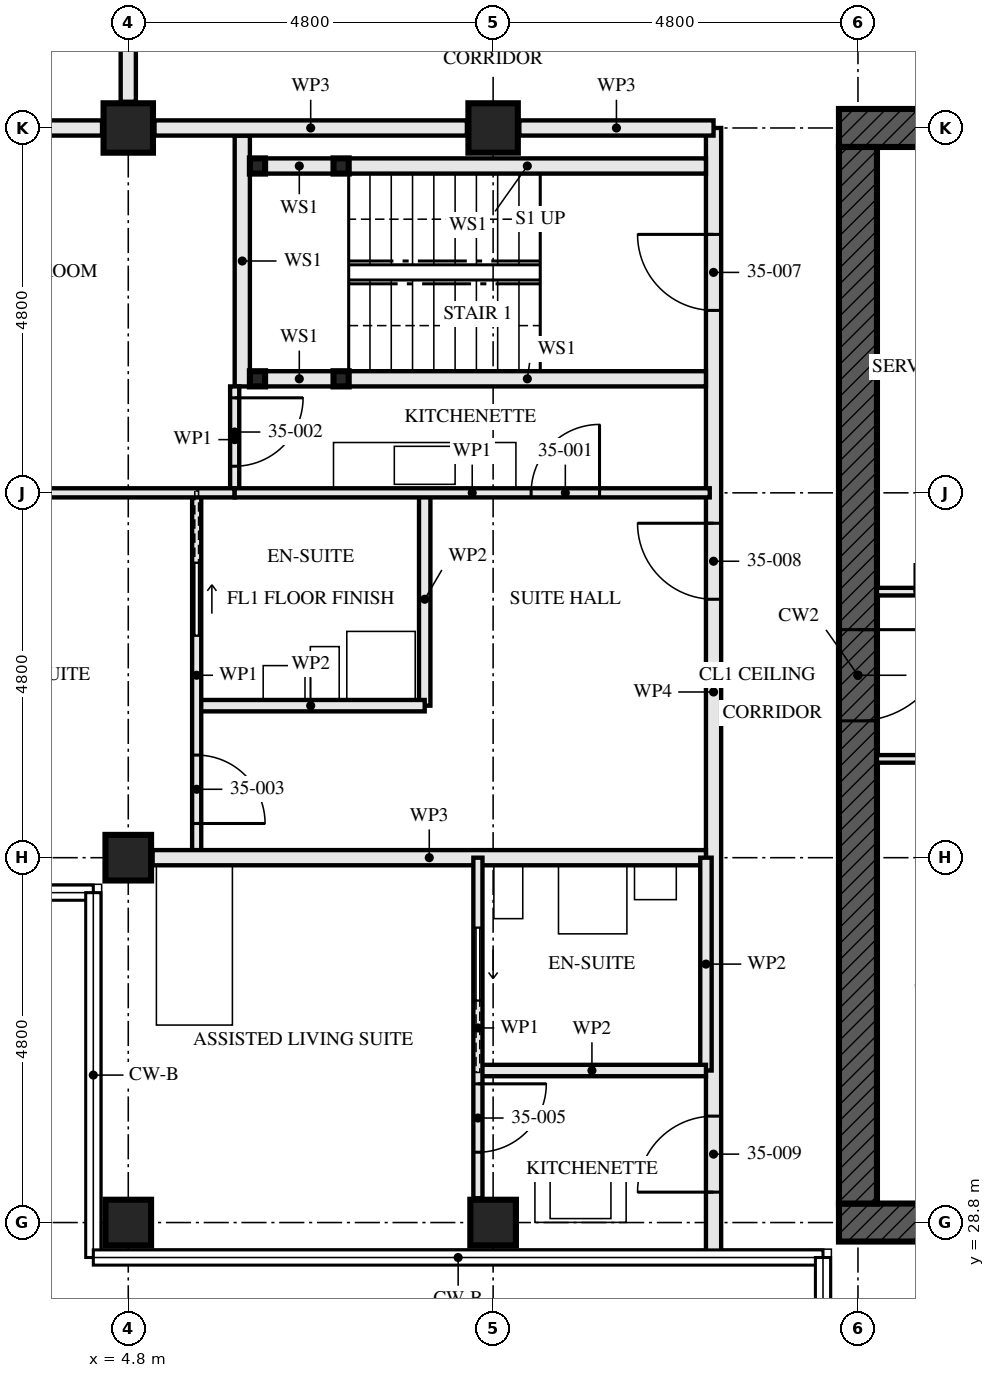
"""IFC4 building model, lengths in metres.
Left out: names, types, materials, properties, quantities, classifications, styles, units other than length and angle.
Written with IfcOpenShell. Run it as: python <this file> out.ifc"""

import sys

from ifc_helpers import new_model, si_unit, direction, frame, frame_2d, origin, origin_2d, place, context, subcontext, project, spatial, rectangle, hollow_rectangle, extrude, element, fill, save


model = new_model("IFC4")
c1 = context("Model", 3, precision=1e-05, world=origin(), true_north=direction((0.0, 1.0)))
c2 = subcontext(c1, "Body", "Model", "MODEL_VIEW")
j1 = project(units=[si_unit("LENGTHUNIT", "METRE"), si_unit("PLANEANGLEUNIT", "RADIAN")], contexts=[c1])
p1 = place(None, origin())
s1 = spatial("IfcSite", under=j1, at=p1, CompositionType="ELEMENT")
p2 = place(p1, origin())
s2 = spatial("IfcBuilding", under=s1, at=p2, CompositionType="ELEMENT")
p3 = place(p2, frame((0.0, 0.0, 129.5)))
s3 = spatial("IfcBuildingStorey", under=s2, at=p3, CompositionType="ELEMENT", Elevation=129.5)
for number, where, z_axis, x_axis in (
    (1, (4.8, 28.8, 0.0), (0.0, 0.0, 1.0), (0.0, 1.0, 0.0)),
    (2, (4.8, 33.6, 0.0), (0.0, 0.0, 1.0), (0.0, 1.0, 0.0)),
):
    element("IfcColumn", number, at=place(p3, frame(where, z_axis=z_axis, x_axis=x_axis)), inside=s3, PredefinedType="COLUMN", context=c2, shape_type="SweptSolid", body=[
        extrude(hollow_rectangle(XDim=0.6, YDim=0.6, WallThickness=0.08, at=origin_2d()), origin(), (0.0, 0.0, 1.0), 3.5),
    ])
p4 = place(p3, frame((4.8, 43.2, 0.0), z_axis=(0.0, 0.0, 1.0), x_axis=(0.0, 1.0, 0.0)))
e3 = element("IfcColumn", 3, at=p4, inside=s3, PredefinedType="COLUMN", context=c2, shape_type="SweptSolid", body=[
    extrude(hollow_rectangle(XDim=0.65, YDim=0.65, WallThickness=0.05, at=origin_2d()), origin(), (0.0, 0.0, 1.0), 3.5),
])
p5 = place(p3, frame((9.6, 28.8, 0.0), z_axis=(0.0, 0.0, 1.0), x_axis=(0.0, 1.0, 0.0)))
e4 = element("IfcColumn", 4, at=p5, inside=s3, PredefinedType="COLUMN", context=c2, shape_type="SweptSolid", body=[
    extrude(hollow_rectangle(XDim=0.6, YDim=0.6, WallThickness=0.08, at=origin_2d()), origin(), (0.0, 0.0, 1.0), 3.5),
])
p6 = place(p3, frame((9.6, 43.2, 0.0), z_axis=(0.0, 0.0, 1.0), x_axis=(0.0, 1.0, 0.0)))
e5 = element("IfcColumn", 5, at=p6, inside=s3, PredefinedType="COLUMN", context=c2, shape_type="SweptSolid", body=[
    extrude(hollow_rectangle(XDim=0.65, YDim=0.65, WallThickness=0.05, at=origin_2d()), origin(), (0.0, 0.0, 1.0), 3.5),
])
p7 = place(p3, frame((14.15, 28.8, -0.17), z_axis=(0.0, 0.0, 1.0), x_axis=(1.0, 0.0, 0.0)))
e6 = element("IfcWall", 6, at=p7, inside=s3, PredefinedType="SHEAR", context=c2, shape_type="SweptSolid", body=[
    extrude(rectangle(XDim=14.9, YDim=0.5, at=frame_2d((7.45, 0.0))), origin(), (0.0, 0.0, 1.0), 3.5),
])
p8 = place(p7, frame((6.85, 0.0, 0.17)))
e7 = element("IfcOpeningElement", 7, at=p8, cuts=e6, PredefinedType="OPENING", context=c2, shape_type="SweptSolid", body=[
    extrude(rectangle(XDim=1.2, YDim=2.1, at=frame_2d((0.6, 1.05))), frame((0.0, 0.26, 0.0), z_axis=(0.0, -1.0, 0.0), x_axis=(1.0, 0.0, 0.0)), (0.0, 0.0, 1.0), 0.521),
])
p9 = place(p3, frame((29.05, 43.2, -0.17), z_axis=(0.0, 0.0, 1.0), x_axis=(-1.0, 0.0, 0.0)))
e8 = element("IfcWall", 8, at=p9, inside=s3, PredefinedType="SHEAR", context=c2, shape_type="SweptSolid", body=[
    extrude(rectangle(XDim=14.9, YDim=0.5, at=frame_2d((7.45, 0.0))), origin(), (0.0, 0.0, 1.0), 3.5),
])
p10 = place(p9, frame((6.85, 0.0, 0.17)))
e9 = element("IfcOpeningElement", 9, at=p10, cuts=e8, PredefinedType="OPENING", context=c2, shape_type="SweptSolid", body=[
    extrude(rectangle(XDim=1.2, YDim=2.1, at=frame_2d((0.6, 1.05))), frame((0.0, 0.26, 0.0), z_axis=(0.0, -1.0, 0.0), x_axis=(1.0, 0.0, 0.0)), (0.0, 0.0, 1.0), 0.521),
])
p11 = place(p3, frame((14.4, 42.95, -0.17), z_axis=(0.0, 0.0, 1.0), x_axis=(0.0, -1.0, 0.0)))
e10 = element("IfcWall", 10, at=p11, inside=s3, PredefinedType="SHEAR", context=c2, shape_type="SweptSolid", body=[
    extrude(rectangle(XDim=13.9, YDim=0.5, at=frame_2d((6.95, 0.0))), origin(), (0.0, 0.0, 1.0), 3.5),
])
p12 = place(p11, frame((6.35, 0.0, 0.17)))
e11 = element("IfcOpeningElement", 11, at=p12, cuts=e10, PredefinedType="OPENING", context=c2, shape_type="SweptSolid", body=[
    extrude(rectangle(XDim=1.2, YDim=2.1, at=frame_2d((0.6, 1.05))), frame((0.0, 0.26, 0.0), z_axis=(0.0, -1.0, 0.0), x_axis=(1.0, 0.0, 0.0)), (0.0, 0.0, 1.0), 0.521),
])
for number, where, z_axis, x_axis in (
    (12, (6.5, 42.7, 0.0), (0.0, 0.0, 1.0), (1.0, 0.0, 0.0)),
    (13, (6.5, 39.9, 0.0), (0.0, 0.0, 1.0), (1.0, 0.0, 0.0)),
    (14, (7.6, 42.7, 0.0), (0.0, 0.0, 1.0), (1.0, 0.0, 0.0)),
    (15, (7.6, 39.9, 0.0), (0.0, 0.0, 1.0), (1.0, 0.0, 0.0)),
):
    element("IfcColumn", number, at=place(p3, frame(where, z_axis=z_axis, x_axis=x_axis)), inside=s3, PredefinedType="COLUMN", context=c2, shape_type="SweptSolid", body=[
        extrude(hollow_rectangle(XDim=0.2, YDim=0.2, WallThickness=0.008, at=origin_2d()), origin(), (0.0, 0.0, 1.0), 3.33),
    ])
p13 = place(p3, frame((6.6, 42.7, 0.0), z_axis=(0.0, 0.0, 1.0), x_axis=(1.0, 0.0, 0.0)))
e16 = element("IfcWall", 16, at=p13, inside=s3, PredefinedType="SOLIDWALL", context=c2, shape_type="SweptSolid", body=[
    extrude(rectangle(XDim=0.9, YDim=0.2, at=frame_2d((0.45, 0.0))), origin(), (0.0, 0.0, 1.0), 2.99),
])
p14 = place(p3, frame((7.7, 42.7, 0.0), z_axis=(0.0, 0.0, 1.0), x_axis=(1.0, 0.0, 0.0)))
e17 = element("IfcWall", 17, at=p14, inside=s3, PredefinedType="SOLIDWALL", context=c2, shape_type="SweptSolid", body=[
    extrude(rectangle(XDim=4.7, YDim=0.2, at=frame_2d((2.35, 0.0))), origin(), (0.0, 0.0, 1.0), 2.99),
])
p15 = place(p3, frame((6.6, 39.9, 0.0), z_axis=(0.0, 0.0, 1.0), x_axis=(1.0, 0.0, 0.0)))
e18 = element("IfcWall", 18, at=p15, inside=s3, PredefinedType="SOLIDWALL", context=c2, shape_type="SweptSolid", body=[
    extrude(rectangle(XDim=0.9, YDim=0.2, at=frame_2d((0.45, 0.0))), origin(), (0.0, 0.0, 1.0), 2.99),
])
p16 = place(p3, frame((7.7, 39.9, 0.0), z_axis=(0.0, 0.0, 1.0), x_axis=(1.0, 0.0, 0.0)))
e19 = element("IfcWall", 19, at=p16, inside=s3, PredefinedType="SOLIDWALL", context=c2, shape_type="SweptSolid", body=[
    extrude(rectangle(XDim=4.7, YDim=0.2, at=frame_2d((2.35, 0.0))), origin(), (0.0, 0.0, 1.0), 2.99),
])
p17 = place(p3, frame((6.3, 43.1, 0.0), z_axis=(0.0, 0.0, 1.0), x_axis=(0.0, -1.0, 0.0)))
e20 = element("IfcWall", 20, at=p17, inside=s3, PredefinedType="SOLIDWALL", context=c2, shape_type="SweptSolid", body=[
    extrude(rectangle(XDim=3.3, YDim=0.2, at=frame_2d((1.65, 0.0))), origin(), (0.0, 0.0, 1.0), 3.33),
])
p18 = place(p3, frame((5.7, 35.6, 0.0), z_axis=(0.0, 0.0, 1.0), x_axis=(1.0, 0.0, 0.0)))
e21 = element("IfcWall", 21, at=p18, inside=s3, PredefinedType="PARTITIONING", context=c2, shape_type="SweptSolid", body=[
    extrude(rectangle(XDim=3.0, YDim=0.15, at=frame_2d((1.5, 0.0))), origin(), (0.0, 0.0, 1.0), 3.33),
])
p19 = place(p3, frame((8.7, 38.4, 0.0), z_axis=(0.0, 0.0, 1.0), x_axis=(0.0, -1.0, 0.0)))
e22 = element("IfcWall", 22, at=p19, inside=s3, PredefinedType="PARTITIONING", context=c2, shape_type="SweptSolid", body=[
    extrude(rectangle(XDim=2.8, YDim=0.15, at=frame_2d((1.4, 0.0))), origin(), (0.0, 0.0, 1.0), 3.33),
])
p20 = place(p3, frame((6.2, 38.4, 0.0), z_axis=(0.0, 0.0, 1.0), x_axis=(1.0, 0.0, 0.0)))
e23 = element("IfcWall", 23, at=p20, inside=s3, PredefinedType="PARTITIONING", context=c2, shape_type="SweptSolid", body=[
    extrude(rectangle(XDim=6.25, YDim=0.12, at=frame_2d((3.125, 0.0))), origin(), (0.0, 0.0, 1.0), 2.55),
])
p21 = place(p20, frame((3.9, 0.0, 0.0)))
e24 = element("IfcOpeningElement", 24, at=p21, cuts=e23, PredefinedType="OPENING", context=c2, shape_type="SweptSolid", body=[
    extrude(rectangle(XDim=0.9, YDim=2.1, at=frame_2d((0.45, 1.05))), frame((0.0, 0.071, 0.0), z_axis=(0.0, -1.0, 0.0), x_axis=(1.0, 0.0, 0.0)), (0.0, 0.0, 1.0), 0.141),
])
p22 = place(p3, frame((6.2, 39.8, 0.0), z_axis=(0.0, 0.0, 1.0), x_axis=(0.0, -1.0, 0.0)))
e25 = element("IfcWall", 25, at=p22, inside=s3, PredefinedType="PARTITIONING", context=c2, shape_type="SweptSolid", body=[
    extrude(rectangle(XDim=1.4, YDim=0.12, at=frame_2d((0.7, 0.0))), origin(), (0.0, 0.0, 1.0), 3.33),
])
p23 = place(p22, frame((0.15, 0.0, 0.0)))
e26 = element("IfcOpeningElement", 26, at=p23, cuts=e25, PredefinedType="OPENING", context=c2, shape_type="SweptSolid", body=[
    extrude(rectangle(XDim=0.9, YDim=2.1, at=frame_2d((0.45, 1.05))), frame((0.0, 0.071, 0.0), z_axis=(0.0, -1.0, 0.0), x_axis=(1.0, 0.0, 0.0)), (0.0, 0.0, 1.0), 0.141),
])
p24 = place(p3, frame((5.7, 38.4, 0.0), z_axis=(0.0, 0.0, 1.0), x_axis=(0.0, -1.0, 0.0)))
e27 = element("IfcWall", 27, at=p24, inside=s3, PredefinedType="PARTITIONING", context=c2, shape_type="SweptSolid", body=[
    extrude(rectangle(XDim=4.8, YDim=0.12, at=frame_2d((2.4, 0.0))), origin(), (0.0, 0.0, 1.0), 3.33),
])
p25 = place(p24, frame((3.45, 0.0, 0.0)))
e28 = element("IfcOpeningElement", 28, at=p25, cuts=e27, PredefinedType="OPENING", context=c2, shape_type="SweptSolid", body=[
    extrude(rectangle(XDim=0.9, YDim=2.1, at=frame_2d((0.45, 1.05))), frame((0.0, 0.071, 0.0), z_axis=(0.0, -1.0, 0.0), x_axis=(1.0, 0.0, 0.0)), (0.0, 0.0, 1.0), 0.141),
])
p26 = place(p24, frame((0.925, 0.0, 0.0)))
e29 = element("IfcOpeningElement", 29, at=p26, cuts=e27, PredefinedType="OPENING", context=c2, shape_type="SweptSolid", body=[
    extrude(rectangle(XDim=0.95, YDim=2.1, at=frame_2d((0.475, 1.05))), frame((0.0, 0.071, 0.0), z_axis=(0.0, -1.0, 0.0), x_axis=(1.0, 0.0, 0.0)), (0.0, 0.0, 1.0), 0.141),
])
p27 = place(p3, frame((0.32, 38.4, 0.0), z_axis=(0.0, 0.0, 1.0), x_axis=(1.0, 0.0, 0.0)))
e30 = element("IfcWall", 30, at=p27, inside=s3, PredefinedType="PARTITIONING", context=c2, shape_type="SweptSolid", body=[
    extrude(rectangle(XDim=5.88, YDim=0.12, at=frame_2d((2.94, 0.0))), origin(), (0.0, 0.0, 1.0), 2.55),
])
p28 = place(p3, frame((5.12, 33.6, 0.0), z_axis=(0.0, 0.0, 1.0), x_axis=(1.0, 0.0, 0.0)))
e31 = element("IfcWall", 31, at=p28, inside=s3, PredefinedType="PARTITIONING", context=c2, shape_type="SweptSolid", body=[
    extrude(rectangle(XDim=7.28, YDim=0.2, at=frame_2d((3.64, 0.0))), origin(), (0.0, 0.0, 1.0), 2.55),
])
p29 = place(p3, frame((9.4, 30.8, 0.0), z_axis=(0.0, 0.0, 1.0), x_axis=(1.0, 0.0, 0.0)))
e32 = element("IfcWall", 32, at=p29, inside=s3, PredefinedType="PARTITIONING", context=c2, shape_type="SweptSolid", body=[
    extrude(rectangle(XDim=3.0, YDim=0.15, at=frame_2d((1.5, 0.0))), origin(), (0.0, 0.0, 1.0), 3.33),
])
p30 = place(p3, frame((12.4, 33.6, 0.0), z_axis=(0.0, 0.0, 1.0), x_axis=(0.0, -1.0, 0.0)))
e33 = element("IfcWall", 33, at=p30, inside=s3, PredefinedType="PARTITIONING", context=c2, shape_type="SweptSolid", body=[
    extrude(rectangle(XDim=2.8, YDim=0.15, at=frame_2d((1.4, 0.0))), origin(), (0.0, 0.0, 1.0), 3.33),
])
p31 = place(p3, frame((9.4, 33.6, 0.0), z_axis=(0.0, 0.0, 1.0), x_axis=(0.0, -1.0, 0.0)))
e34 = element("IfcWall", 34, at=p31, inside=s3, PredefinedType="PARTITIONING", context=c2, shape_type="SweptSolid", body=[
    extrude(rectangle(XDim=4.48, YDim=0.12, at=frame_2d((2.24, 0.0))), origin(), (0.0, 0.0, 1.0), 3.33),
])
p32 = place(p31, frame((2.975, 0.0, 0.0)))
e35 = element("IfcOpeningElement", 35, at=p32, cuts=e34, PredefinedType="OPENING", context=c2, shape_type="SweptSolid", body=[
    extrude(rectangle(XDim=0.9, YDim=2.1, at=frame_2d((0.45, 1.05))), frame((0.0, 0.071, 0.0), z_axis=(0.0, -1.0, 0.0), x_axis=(1.0, 0.0, 0.0)), (0.0, 0.0, 1.0), 0.141),
])
p33 = place(p31, frame((0.925, 0.0, 0.0)))
e36 = element("IfcOpeningElement", 36, at=p33, cuts=e34, PredefinedType="OPENING", context=c2, shape_type="SweptSolid", body=[
    extrude(rectangle(XDim=0.95, YDim=2.1, at=frame_2d((0.475, 1.05))), frame((0.0, 0.071, 0.0), z_axis=(0.0, -1.0, 0.0), x_axis=(1.0, 0.0, 0.0)), (0.0, 0.0, 1.0), 0.141),
])
p34 = place(p3, frame((12.5, 43.2, 0.0), z_axis=(0.0, 0.0, 1.0), x_axis=(0.0, -1.0, 0.0)))
e37 = element("IfcWall", 37, at=p34, inside=s3, PredefinedType="PARTITIONING", context=c2, shape_type="SweptSolid", body=[
    extrude(rectangle(XDim=14.84, YDim=0.2, at=frame_2d((7.42, 0.0))), origin(), (0.0, 0.0, 1.0), 2.32),
])
p35 = place(p34, frame((1.4, 0.0, 0.0)))
e38 = element("IfcOpeningElement", 38, at=p35, cuts=e37, PredefinedType="OPENING", context=c2, shape_type="SweptSolid", body=[
    extrude(rectangle(XDim=1.0, YDim=2.1, at=frame_2d((0.5, 1.05))), frame((0.0, 0.111, 0.0), z_axis=(0.0, -1.0, 0.0), x_axis=(1.0, 0.0, 0.0)), (0.0, 0.0, 1.0), 0.221),
])
p36 = place(p34, frame((5.2, 0.0, 0.0)))
e39 = element("IfcOpeningElement", 39, at=p36, cuts=e37, PredefinedType="OPENING", context=c2, shape_type="SweptSolid", body=[
    extrude(rectangle(XDim=1.0, YDim=2.1, at=frame_2d((0.5, 1.05))), frame((0.0, 0.111, 0.0), z_axis=(0.0, -1.0, 0.0), x_axis=(1.0, 0.0, 0.0)), (0.0, 0.0, 1.0), 0.221),
])
p37 = place(p34, frame((13.0, 0.0, 0.0)))
e40 = element("IfcOpeningElement", 40, at=p37, cuts=e37, PredefinedType="OPENING", context=c2, shape_type="SweptSolid", body=[
    extrude(rectangle(XDim=1.0, YDim=2.1, at=frame_2d((0.5, 1.05))), frame((0.0, 0.111, 0.0), z_axis=(0.0, -1.0, 0.0), x_axis=(1.0, 0.0, 0.0)), (0.0, 0.0, 1.0), 0.221),
])
p38 = place(p3, frame((4.8, 45.2, 0.0), z_axis=(0.0, 0.0, 1.0), x_axis=(0.0, -1.0, 0.0)))
e41 = element("IfcWall", 41, at=p38, inside=s3, PredefinedType="PARTITIONING", context=c2, shape_type="SweptSolid", body=[
    extrude(rectangle(XDim=1.655, YDim=0.2, at=frame_2d((0.828, 0.0))), origin(), (0.0, 0.0, 1.0), 3.33),
])
p39 = place(p3, frame((14.65, 34.9, 0.0), z_axis=(0.0, 0.0, 1.0), x_axis=(1.0, 0.0, 0.0)))
e42 = element("IfcWall", 42, at=p39, inside=s3, PredefinedType="SOLIDWALL", context=c2, shape_type="SweptSolid", body=[
    extrude(rectangle(XDim=5.9, YDim=0.1, at=frame_2d((2.95, 0.0))), origin(), (0.0, 0.0, 1.0), 3.33),
])
p40 = place(p39, frame((1.6, 0.0, 0.0)))
e43 = element("IfcOpeningElement", 43, at=p40, cuts=e42, PredefinedType="OPENING", context=c2, shape_type="SweptSolid", body=[
    extrude(rectangle(XDim=0.7, YDim=2.1, at=frame_2d((0.35, 1.05))), frame((0.0, 0.061, 0.0), z_axis=(0.0, -1.0, 0.0), x_axis=(1.0, 0.0, 0.0)), (0.0, 0.0, 1.0), 0.121),
])
p41 = place(p3, frame((14.65, 37.1, 0.0), z_axis=(0.0, 0.0, 1.0), x_axis=(1.0, 0.0, 0.0)))
e44 = element("IfcWall", 44, at=p41, inside=s3, PredefinedType="SOLIDWALL", context=c2, shape_type="SweptSolid", body=[
    extrude(rectangle(XDim=5.9, YDim=0.1, at=frame_2d((2.95, 0.0))), origin(), (0.0, 0.0, 1.0), 3.33),
])
p42 = place(p41, frame((0.5, 0.0, 0.0)))
e45 = element("IfcOpeningElement", 45, at=p42, cuts=e44, PredefinedType="OPENING", context=c2, shape_type="SweptSolid", body=[
    extrude(rectangle(XDim=0.7, YDim=2.1, at=frame_2d((0.35, 1.05))), frame((0.0, 0.061, 0.0), z_axis=(0.0, -1.0, 0.0), x_axis=(1.0, 0.0, 0.0)), (0.0, 0.0, 1.0), 0.121),
])
p43 = place(p41, frame((1.9, 0.0, 0.0)))
e46 = element("IfcOpeningElement", 46, at=p43, cuts=e44, PredefinedType="OPENING", context=c2, shape_type="SweptSolid", body=[
    extrude(rectangle(XDim=0.9, YDim=2.1, at=frame_2d((0.45, 1.05))), frame((0.0, 0.061, 0.0), z_axis=(0.0, -1.0, 0.0), x_axis=(1.0, 0.0, 0.0)), (0.0, 0.0, 1.0), 0.121),
])
p44 = place(p3, frame((12.5, 43.2, 0.0), z_axis=(0.0, 0.0, 1.0), x_axis=(-1.0, 0.0, 0.0)))
e47 = element("IfcWall", 47, at=p44, inside=s3, PredefinedType="PARTITIONING", context=c2, shape_type="SweptSolid", body=[
    extrude(rectangle(XDim=2.555, YDim=0.2, at=frame_2d((1.277, 0.0))), origin(), (0.0, 0.0, 1.0), 2.32),
])
p45 = place(p3, frame((9.255, 43.2, 0.0), z_axis=(0.0, 0.0, 1.0), x_axis=(-1.0, 0.0, 0.0)))
e48 = element("IfcWall", 48, at=p45, inside=s3, PredefinedType="PARTITIONING", context=c2, shape_type="SweptSolid", body=[
    extrude(rectangle(XDim=4.11, YDim=0.2, at=frame_2d((2.055, 0.0))), origin(), (0.0, 0.0, 1.0), 2.32),
])
p46 = place(p3, frame((4.455, 43.2, 0.0), z_axis=(0.0, 0.0, 1.0), x_axis=(-1.0, 0.0, 0.0)))
e49 = element("IfcWall", 49, at=p46, inside=s3, PredefinedType="PARTITIONING", context=c2, shape_type="SweptSolid", body=[
    extrude(rectangle(XDim=4.135, YDim=0.2, at=frame_2d((2.067, 0.0))), origin(), (0.0, 0.0, 1.0), 2.32),
])
p47 = place(p21, origin())
e50 = element("IfcDoor", 50, at=p47, inside=s3, OperationType="SINGLE_SWING_LEFT", PredefinedType="DOOR", context=c2, shape_type="SweptSolid", body=[
    extrude(rectangle(XDim=0.9, YDim=2.1, at=frame_2d((0.45, 1.05))), frame((0.0, 0.022, 0.0), z_axis=(0.0, -1.0, 0.0), x_axis=(1.0, 0.0, 0.0)), (0.0, 0.0, 1.0), 0.044),
])
fill(e24, e50)
p48 = place(p23, origin())
e51 = element("IfcDoor", 51, at=p48, inside=s3, OperationType="SINGLE_SWING_RIGHT", PredefinedType="DOOR", context=c2, shape_type="SweptSolid", body=[
    extrude(rectangle(XDim=0.9, YDim=2.1, at=frame_2d((0.45, 1.05))), frame((0.0, 0.022, 0.0), z_axis=(0.0, -1.0, 0.0), x_axis=(1.0, 0.0, 0.0)), (0.0, 0.0, 1.0), 0.044),
])
fill(e26, e51)
p49 = place(p25, origin())
e52 = element("IfcDoor", 52, at=p49, inside=s3, OperationType="SINGLE_SWING_LEFT", PredefinedType="DOOR", context=c2, shape_type="SweptSolid", body=[
    extrude(rectangle(XDim=0.9, YDim=2.1, at=frame_2d((0.45, 1.05))), frame((0.0, 0.022, 0.0), z_axis=(0.0, -1.0, 0.0), x_axis=(1.0, 0.0, 0.0)), (0.0, 0.0, 1.0), 0.044),
])
fill(e28, e52)
p50 = place(p26, origin())
e53 = element("IfcDoor", 53, at=p50, inside=s3, OperationType="SLIDING_TO_RIGHT", PredefinedType="DOOR", context=c2, shape_type="SweptSolid", body=[
    extrude(rectangle(XDim=0.95, YDim=2.1, at=frame_2d((0.475, 1.05))), frame((0.0, 0.022, 0.0), z_axis=(0.0, -1.0, 0.0), x_axis=(1.0, 0.0, 0.0)), (0.0, 0.0, 1.0), 0.044),
])
fill(e29, e53)
p51 = place(p32, origin())
e54 = element("IfcDoor", 54, at=p51, inside=s3, OperationType="SINGLE_SWING_RIGHT", PredefinedType="DOOR", context=c2, shape_type="SweptSolid", body=[
    extrude(rectangle(XDim=0.9, YDim=2.1, at=frame_2d((0.45, 1.05))), frame((0.0, 0.022, 0.0), z_axis=(0.0, -1.0, 0.0), x_axis=(1.0, 0.0, 0.0)), (0.0, 0.0, 1.0), 0.044),
])
fill(e35, e54)
p52 = place(p33, origin())
e55 = element("IfcDoor", 55, at=p52, inside=s3, OperationType="SLIDING_TO_LEFT", PredefinedType="DOOR", context=c2, shape_type="SweptSolid", body=[
    extrude(rectangle(XDim=0.95, YDim=2.1, at=frame_2d((0.475, 1.05))), frame((0.0, 0.022, 0.0), z_axis=(0.0, -1.0, 0.0), x_axis=(1.0, 0.0, 0.0)), (0.0, 0.0, 1.0), 0.044),
])
fill(e36, e55)
p53 = place(p35, frame((1.0, 0.0, 0.0), z_axis=(0.0, 0.0, 1.0), x_axis=(-1.0, 0.0, 0.0)))
e56 = element("IfcDoor", 56, at=p53, inside=s3, OperationType="SINGLE_SWING_LEFT", PredefinedType="DOOR", context=c2, shape_type="SweptSolid", body=[
    extrude(rectangle(XDim=1.0, YDim=2.1, at=frame_2d((0.5, 1.05))), frame((0.0, 0.032, 0.0), z_axis=(0.0, -1.0, 0.0), x_axis=(1.0, 0.0, 0.0)), (0.0, 0.0, 1.0), 0.064),
])
fill(e38, e56)
p54 = place(p36, frame((1.0, 0.0, 0.0), z_axis=(0.0, 0.0, 1.0), x_axis=(-1.0, 0.0, 0.0)))
e57 = element("IfcDoor", 57, at=p54, inside=s3, OperationType="SINGLE_SWING_LEFT", PredefinedType="DOOR", context=c2, shape_type="SweptSolid", body=[
    extrude(rectangle(XDim=1.0, YDim=2.1, at=frame_2d((0.5, 1.05))), frame((0.0, 0.027, 0.0), z_axis=(0.0, -1.0, 0.0), x_axis=(1.0, 0.0, 0.0)), (0.0, 0.0, 1.0), 0.054),
])
fill(e39, e57)
p55 = place(p37, frame((1.0, 0.0, 0.0), z_axis=(0.0, 0.0, 1.0), x_axis=(-1.0, 0.0, 0.0)))
e58 = element("IfcDoor", 58, at=p55, inside=s3, OperationType="SINGLE_SWING_RIGHT", PredefinedType="DOOR", context=c2, shape_type="SweptSolid", body=[
    extrude(rectangle(XDim=1.0, YDim=2.1, at=frame_2d((0.5, 1.05))), frame((0.0, 0.027, 0.0), z_axis=(0.0, -1.0, 0.0), x_axis=(1.0, 0.0, 0.0)), (0.0, 0.0, 1.0), 0.054),
])
fill(e40, e58)
p56 = place(p12, origin())
e59 = element("IfcDoor", 59, at=p56, inside=s3, OperationType="SINGLE_SWING_LEFT", PredefinedType="DOOR", context=c2, shape_type="SweptSolid", body=[
    extrude(rectangle(XDim=1.2, YDim=2.1, at=frame_2d((0.6, 1.05))), frame((0.0, 0.027, 0.0), z_axis=(0.0, -1.0, 0.0), x_axis=(1.0, 0.0, 0.0)), (0.0, 0.0, 1.0), 0.054),
])
fill(e11, e59)
save(model, sys.argv[1])
